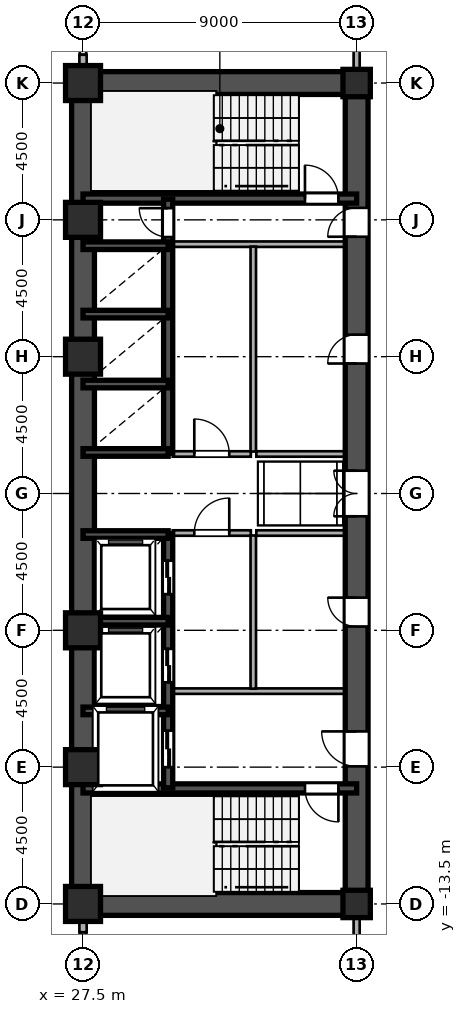
"""IFC4 building model, lengths in metres.
Left out: names, types, materials, properties, quantities, classifications, styles, units other than length and angle.
Written with IfcOpenShell. Run it as: python <this file> out.ifc"""

import sys

from ifc_helpers import new_model, si_unit, direction, frame, frame_2d, origin, origin_2d, place, context, subcontext, project, spatial, rectangle, hollow_rectangle, i_section, extrude, source, transform, mapped, element, fill, save


model = new_model("IFC4")
c1 = context("Model", 3, precision=1e-05, world=origin(), true_north=direction((0.0, 1.0)))
c2 = subcontext(c1, "Body", "Model", "MODEL_VIEW")
j1 = project(units=[si_unit("LENGTHUNIT", "METRE"), si_unit("PLANEANGLEUNIT", "RADIAN")], contexts=[c1])
p1 = place(None, origin())
s1 = spatial("IfcSite", under=j1, at=p1, CompositionType="ELEMENT")
p2 = place(p1, origin())
s2 = spatial("IfcBuilding", under=s1, at=p2, CompositionType="ELEMENT")
p3 = place(p2, frame((0.0, 0.0, 22.5)))
s3 = spatial("IfcBuildingStorey", under=s2, at=p3, CompositionType="ELEMENT", Elevation=22.5)
m1 = source(origin(), c2, "Body", "SweptSolid", [
    extrude(hollow_rectangle(XDim=1.15, YDim=1.15, WallThickness=0.048, at=origin_2d()), origin(), (0.0, 0.0, 1.0), 3.6),
])
for number, where, z_axis, x_axis in (
    (1, (27.5, -13.5, 0.0), (0.0, 0.0, 1.0), (1.0, 0.0, 0.0)),
    (2, (27.5, -9.0, 0.0), (0.0, 0.0, 1.0), (1.0, 0.0, 0.0)),
    (3, (27.5, -4.5, 0.0), (0.0, 0.0, 1.0), (1.0, 0.0, 0.0)),
    (4, (27.5, 4.5, 0.0), (0.0, 0.0, 1.0), (1.0, 0.0, 0.0)),
    (5, (27.5, 9.0, 0.0), (0.0, 0.0, 1.0), (1.0, 0.0, 0.0)),
    (6, (27.5, 13.5, 0.0), (0.0, 0.0, 1.0), (1.0, 0.0, 0.0)),
):
    element("IfcColumn", number, at=place(p3, frame(where, z_axis=z_axis, x_axis=x_axis)), inside=s3, PredefinedType="COLUMN", context=c2, shape_type="MappedRepresentation", body=[
        mapped(m1, transform((0.0, 0.0, 0.0), scale=1.0)),
    ])
m2 = source(origin(), c2, "Body", "SweptSolid", [
    extrude(i_section(OverallWidth=0.9, OverallDepth=0.9, WebThickness=0.036, FlangeThickness=0.055, at=origin_2d()), origin(), (0.0, 0.0, 1.0), 3.6),
])
for number, where, z_axis, x_axis in (
    (7, (36.5, -13.5, 0.0), (0.0, 0.0, 1.0), (1.0, 0.0, 0.0)),
    (8, (36.5, 13.5, 0.0), (0.0, 0.0, 1.0), (1.0, 0.0, 0.0)),
):
    element("IfcColumn", number, at=place(p3, frame(where, z_axis=z_axis, x_axis=x_axis)), inside=s3, PredefinedType="COLUMN", context=c2, shape_type="MappedRepresentation", body=[
        mapped(m2, transform((0.0, 0.0, 0.0), scale=1.0)),
    ])
for number, where, z_axis, x_axis in (
    (9, (27.5, -14.43, 0.0), (0.0, 0.0, 1.0), (0.0, 1.0, 0.0)),
    (10, (27.5, 13.88, 0.0), (0.0, 0.0, 1.0), (0.0, 1.0, 0.0)),
):
    element("IfcWall", number, at=place(p3, frame(where, z_axis=z_axis, x_axis=x_axis)), inside=s3, PredefinedType="SOLIDWALL", context=c2, shape_type="SweptSolid", body=[
        extrude(rectangle(XDim=0.55, YDim=0.24, at=frame_2d((0.275, 0.0))), origin(), (0.0, 0.0, 1.0), 2.88),
    ])
for number, where, z_axis, x_axis in (
    (11, (27.5, -13.5, 0.0), (0.0, 0.0, 1.0), (0.0, 1.0, 0.0)),
    (12, (27.5, 1.3, 0.0), (0.0, 0.0, 1.0), (0.0, 1.0, 0.0)),
):
    element("IfcWall", number, at=place(p3, frame(where, z_axis=z_axis, x_axis=x_axis)), inside=s3, PredefinedType="SHEAR", context=c2, shape_type="SweptSolid", body=[
        extrude(rectangle(XDim=12.2, YDim=0.75, at=frame_2d((6.1, 0.0))), origin(), (0.0, 0.0, 1.0), 3.38),
    ])
p4 = place(p3, frame((27.5, -1.3, 0.0), z_axis=(0.0, 0.0, 1.0), x_axis=(0.0, 1.0, 0.0)))
e13 = element("IfcWall", 13, at=p4, inside=s3, PredefinedType="SHEAR", context=c2, shape_type="SweptSolid", body=[
    extrude(rectangle(XDim=2.6, YDim=0.75, at=frame_2d((1.3, 0.0))), origin(), (0.0, 0.0, 1.0), 3.38),
])
for number, where, z_axis, x_axis in (
    (14, (27.5, -13.5, 0.0), (0.0, 0.0, 1.0), (1.0, 0.0, 0.0)),
    (15, (27.5, 13.5, 0.0), (0.0, 0.0, 1.0), (1.0, 0.0, 0.0)),
):
    element("IfcWall", number, at=place(p3, frame(where, z_axis=z_axis, x_axis=x_axis)), inside=s3, PredefinedType="SHEAR", context=c2, shape_type="SweptSolid", body=[
        extrude(rectangle(XDim=9.0, YDim=0.75, at=frame_2d((4.5, 0.0))), origin(), (0.0, 0.0, 1.0), 3.38),
    ])
p5 = place(p3, frame((36.5, -13.65, 0.0), z_axis=(0.0, 0.0, 1.0), x_axis=(0.0, 1.0, 0.0)))
e16 = element("IfcWall", 16, at=p5, inside=s3, PredefinedType="SHEAR", context=c2, shape_type="SweptSolid", body=[
    extrude(rectangle(XDim=7.15, YDim=0.75, at=frame_2d((3.575, 0.0))), origin(), (0.0, 0.0, 1.0), 3.38),
])
p6 = place(p5, frame((4.675, 0.0, 0.0)))
e17 = element("IfcOpeningElement", 17, at=p6, cuts=e16, PredefinedType="OPENING", context=c2, shape_type="SweptSolid", body=[
    extrude(rectangle(XDim=1.15, YDim=2.2, at=frame_2d((0.575, 1.1))), frame((0.0, 0.385, 0.0), z_axis=(0.0, -1.0, 0.0), x_axis=(1.0, 0.0, 0.0)), (0.0, 0.0, 1.0), 0.77),
])
p7 = place(p3, frame((36.5, -1.3, 0.0), z_axis=(0.0, 0.0, 1.0), x_axis=(0.0, 1.0, 0.0)))
e18 = element("IfcWall", 18, at=p7, inside=s3, PredefinedType="SHEAR", context=c2, shape_type="SweptSolid", body=[
    extrude(rectangle(XDim=2.6, YDim=0.75, at=frame_2d((1.3, 0.0))), origin(), (0.0, 0.0, 1.0), 3.38),
])
p8 = place(p7, frame((0.55, 0.0, 0.0)))
e19 = element("IfcOpeningElement", 19, at=p8, cuts=e18, PredefinedType="OPENING", context=c2, shape_type="SweptSolid", body=[
    extrude(rectangle(XDim=1.5, YDim=2.3, at=frame_2d((0.75, 1.15))), frame((0.0, 0.385, 0.0), z_axis=(0.0, -1.0, 0.0), x_axis=(1.0, 0.0, 0.0)), (0.0, 0.0, 1.0), 0.77),
])
p9 = place(p3, frame((36.5, 8.2, 0.0), z_axis=(0.0, 0.0, 1.0), x_axis=(0.0, 1.0, 0.0)))
e20 = element("IfcWall", 20, at=p9, inside=s3, PredefinedType="SHEAR", context=c2, shape_type="SweptSolid", body=[
    extrude(rectangle(XDim=5.45, YDim=0.75, at=frame_2d((2.725, 0.0))), origin(), (0.0, 0.0, 1.0), 3.38),
])
p10 = place(p9, frame((0.245, 0.0, 0.0)))
e21 = element("IfcOpeningElement", 21, at=p10, cuts=e20, PredefinedType="OPENING", context=c2, shape_type="SweptSolid", body=[
    extrude(rectangle(XDim=0.95, YDim=2.15, at=frame_2d((0.475, 1.075))), frame((0.0, 0.385, 0.0), z_axis=(0.0, -1.0, 0.0), x_axis=(1.0, 0.0, 0.0)), (0.0, 0.0, 1.0), 0.77),
])
p11 = place(p3, frame((36.5, -6.5, 0.0), z_axis=(0.0, 0.0, 1.0), x_axis=(0.0, 1.0, 0.0)))
e22 = element("IfcWall", 22, at=p11, inside=s3, PredefinedType="SHEAR", context=c2, shape_type="SweptSolid", body=[
    extrude(rectangle(XDim=5.2, YDim=0.75, at=frame_2d((2.6, 0.0))), origin(), (0.0, 0.0, 1.0), 3.38),
])
p12 = place(p11, frame((2.125, 0.0, 0.0)))
e23 = element("IfcOpeningElement", 23, at=p12, cuts=e22, PredefinedType="OPENING", context=c2, shape_type="SweptSolid", body=[
    extrude(rectangle(XDim=0.95, YDim=2.15, at=frame_2d((0.475, 1.075))), frame((0.0, 0.385, 0.0), z_axis=(0.0, -1.0, 0.0), x_axis=(1.0, 0.0, 0.0)), (0.0, 0.0, 1.0), 0.77),
])
p13 = place(p3, frame((36.5, 1.3, 0.0), z_axis=(0.0, 0.0, 1.0), x_axis=(0.0, 1.0, 0.0)))
e24 = element("IfcWall", 24, at=p13, inside=s3, PredefinedType="SHEAR", context=c2, shape_type="SweptSolid", body=[
    extrude(rectangle(XDim=6.9, YDim=0.75, at=frame_2d((3.45, 0.0))), origin(), (0.0, 0.0, 1.0), 3.38),
])
p14 = place(p13, frame((2.975, 0.0, 0.0)))
e25 = element("IfcOpeningElement", 25, at=p14, cuts=e24, PredefinedType="OPENING", context=c2, shape_type="SweptSolid", body=[
    extrude(rectangle(XDim=0.95, YDim=2.15, at=frame_2d((0.475, 1.075))), frame((0.0, 0.385, 0.0), z_axis=(0.0, -1.0, 0.0), x_axis=(1.0, 0.0, 0.0)), (0.0, 0.0, 1.0), 0.77),
])
p15 = place(p3, frame((27.5, -9.7, 0.0), z_axis=(0.0, 0.0, 1.0), x_axis=(1.0, 0.0, 0.0)))
e26 = element("IfcWall", 26, at=p15, inside=s3, PredefinedType="SHEAR", context=c2, shape_type="SweptSolid", body=[
    extrude(rectangle(XDim=9.0, YDim=0.3, at=frame_2d((4.5, 0.0))), origin(), (0.0, 0.0, 1.0), 3.38),
])
p16 = place(p15, frame((7.3, 0.0, 0.0)))
e27 = element("IfcOpeningElement", 27, at=p16, cuts=e26, PredefinedType="OPENING", context=c2, shape_type="SweptSolid", body=[
    extrude(rectangle(XDim=1.1, YDim=2.2, at=frame_2d((0.55, 1.1))), frame((0.0, 0.16, 0.0), z_axis=(0.0, -1.0, 0.0), x_axis=(1.0, 0.0, 0.0)), (0.0, 0.0, 1.0), 0.32),
])
p17 = place(p3, frame((27.5, 9.7, 0.0), z_axis=(0.0, 0.0, 1.0), x_axis=(1.0, 0.0, 0.0)))
e28 = element("IfcWall", 28, at=p17, inside=s3, PredefinedType="SHEAR", context=c2, shape_type="SweptSolid", body=[
    extrude(rectangle(XDim=9.0, YDim=0.3, at=frame_2d((4.5, 0.0))), origin(), (0.0, 0.0, 1.0), 3.38),
])
p18 = place(p17, frame((7.3, 0.0, 0.0)))
e29 = element("IfcOpeningElement", 29, at=p18, cuts=e28, PredefinedType="OPENING", context=c2, shape_type="SweptSolid", body=[
    extrude(rectangle(XDim=1.1, YDim=2.2, at=frame_2d((0.55, 1.1))), frame((0.0, 0.16, 0.0), z_axis=(0.0, -1.0, 0.0), x_axis=(1.0, 0.0, 0.0)), (0.0, 0.0, 1.0), 0.32),
])
for number, where, z_axis, x_axis in (
    (30, (27.5, -7.15, 0.0), (0.0, 0.0, 1.0), (1.0, 0.0, 0.0)),
    (31, (27.5, -4.2, 0.0), (0.0, 0.0, 1.0), (1.0, 0.0, 0.0)),
    (32, (27.5, -1.35, 0.0), (0.0, 0.0, 1.0), (1.0, 0.0, 0.0)),
    (33, (27.5, 1.35, 0.0), (0.0, 0.0, 1.0), (1.0, 0.0, 0.0)),
    (34, (27.5, 3.6, 0.0), (0.0, 0.0, 1.0), (1.0, 0.0, 0.0)),
    (35, (27.5, 5.9, 0.0), (0.0, 0.0, 1.0), (1.0, 0.0, 0.0)),
    (36, (27.5, 8.15, 0.0), (0.0, 0.0, 1.0), (1.0, 0.0, 0.0)),
):
    element("IfcWall", number, at=place(p3, frame(where, z_axis=z_axis, x_axis=x_axis)), inside=s3, PredefinedType="SHEAR", context=c2, shape_type="SweptSolid", body=[
        extrude(rectangle(XDim=2.8, YDim=0.25, at=frame_2d((1.4, 0.0))), origin(), (0.0, 0.0, 1.0), 3.38),
    ])
p19 = place(p3, frame((30.3, -9.68, 0.0), z_axis=(0.0, 0.0, 1.0), x_axis=(0.0, 1.0, 0.0)))
e37 = element("IfcWall", 37, at=p19, inside=s3, PredefinedType="SHEAR", context=c2, shape_type="SweptSolid", body=[
    extrude(rectangle(XDim=2.56, YDim=0.3, at=frame_2d((1.28, 0.0))), origin(), (0.0, 0.0, 1.0), 3.38),
])
p20 = place(p19, frame((0.68, 0.0, 0.0)))
e38 = element("IfcOpeningElement", 38, at=p20, cuts=e37, PredefinedType="OPENING", context=c2, shape_type="SweptSolid", body=[
    extrude(rectangle(XDim=1.2, YDim=2.25, at=frame_2d((0.6, 1.125))), frame((0.0, 0.16, 0.0), z_axis=(0.0, -1.0, 0.0), x_axis=(1.0, 0.0, 0.0)), (0.0, 0.0, 1.0), 0.32),
])
p21 = place(p3, frame((30.3, -7.12, 0.0), z_axis=(0.0, 0.0, 1.0), x_axis=(0.0, 1.0, 0.0)))
e39 = element("IfcWall", 39, at=p21, inside=s3, PredefinedType="SHEAR", context=c2, shape_type="SweptSolid", body=[
    extrude(rectangle(XDim=2.92, YDim=0.3, at=frame_2d((1.46, 0.0))), origin(), (0.0, 0.0, 1.0), 3.38),
])
p22 = place(p21, frame((0.91, 0.0, 0.0)))
e40 = element("IfcOpeningElement", 40, at=p22, cuts=e39, PredefinedType="OPENING", context=c2, shape_type="SweptSolid", body=[
    extrude(rectangle(XDim=1.1, YDim=2.2, at=frame_2d((0.55, 1.1))), frame((0.0, 0.16, 0.0), z_axis=(0.0, -1.0, 0.0), x_axis=(1.0, 0.0, 0.0)), (0.0, 0.0, 1.0), 0.32),
])
p23 = place(p3, frame((30.3, -4.2, 0.0), z_axis=(0.0, 0.0, 1.0), x_axis=(0.0, 1.0, 0.0)))
e41 = element("IfcWall", 41, at=p23, inside=s3, PredefinedType="SHEAR", context=c2, shape_type="SweptSolid", body=[
    extrude(rectangle(XDim=2.88, YDim=0.3, at=frame_2d((1.44, 0.0))), origin(), (0.0, 0.0, 1.0), 3.38),
])
p24 = place(p23, frame((0.89, 0.0, 0.0)))
e42 = element("IfcOpeningElement", 42, at=p24, cuts=e41, PredefinedType="OPENING", context=c2, shape_type="SweptSolid", body=[
    extrude(rectangle(XDim=1.1, YDim=2.2, at=frame_2d((0.55, 1.1))), frame((0.0, 0.16, 0.0), z_axis=(0.0, -1.0, 0.0), x_axis=(1.0, 0.0, 0.0)), (0.0, 0.0, 1.0), 0.32),
])
p25 = place(p3, frame((30.3, 1.32, 0.0), z_axis=(0.0, 0.0, 1.0), x_axis=(0.0, 1.0, 0.0)))
e43 = element("IfcWall", 43, at=p25, inside=s3, PredefinedType="SHEAR", context=c2, shape_type="SweptSolid", body=[
    extrude(rectangle(XDim=2.28, YDim=0.3, at=frame_2d((1.14, 0.0))), origin(), (0.0, 0.0, 1.0), 3.38),
])
p26 = place(p3, frame((30.3, 3.6, 0.0), z_axis=(0.0, 0.0, 1.0), x_axis=(0.0, 1.0, 0.0)))
e44 = element("IfcWall", 44, at=p26, inside=s3, PredefinedType="SHEAR", context=c2, shape_type="SweptSolid", body=[
    extrude(rectangle(XDim=2.3, YDim=0.3, at=frame_2d((1.15, 0.0))), origin(), (0.0, 0.0, 1.0), 3.38),
])
p27 = place(p3, frame((30.3, 5.9, 0.0), z_axis=(0.0, 0.0, 1.0), x_axis=(0.0, 1.0, 0.0)))
e45 = element("IfcWall", 45, at=p27, inside=s3, PredefinedType="SHEAR", context=c2, shape_type="SweptSolid", body=[
    extrude(rectangle(XDim=2.25, YDim=0.3, at=frame_2d((1.125, 0.0))), origin(), (0.0, 0.0, 1.0), 3.38),
])
p28 = place(p3, frame((30.3, 8.15, 0.0), z_axis=(0.0, 0.0, 1.0), x_axis=(0.0, 1.0, 0.0)))
e46 = element("IfcWall", 46, at=p28, inside=s3, PredefinedType="SHEAR", context=c2, shape_type="SweptSolid", body=[
    extrude(rectangle(XDim=1.53, YDim=0.3, at=frame_2d((0.765, 0.0))), origin(), (0.0, 0.0, 1.0), 3.38),
])
p29 = place(p28, frame((0.285, 0.0, 0.0)))
e47 = element("IfcOpeningElement", 47, at=p29, cuts=e46, PredefinedType="OPENING", context=c2, shape_type="SweptSolid", body=[
    extrude(rectangle(XDim=0.95, YDim=2.15, at=frame_2d((0.475, 1.075))), frame((0.0, 0.16, 0.0), z_axis=(0.0, -1.0, 0.0), x_axis=(1.0, 0.0, 0.0)), (0.0, 0.0, 1.0), 0.32),
])
for number, where, z_axis, x_axis in (
    (48, (30.45, -6.5, 0.0), (0.0, 0.0, 1.0), (1.0, 0.0, 0.0)),
    (49, (30.45, 8.2, 0.0), (0.0, 0.0, 1.0), (1.0, 0.0, 0.0)),
):
    element("IfcWall", number, at=place(p3, frame(where, z_axis=z_axis, x_axis=x_axis)), inside=s3, PredefinedType="PARTITIONING", context=c2, shape_type="SweptSolid", body=[
        extrude(rectangle(XDim=5.7, YDim=0.18, at=frame_2d((2.85, 0.0))), origin(), (0.0, 0.0, 1.0), 3.38),
    ])
p30 = place(p3, frame((33.1, -6.42, 0.0), z_axis=(0.0, 0.0, 1.0), x_axis=(0.0, 1.0, 0.0)))
e50 = element("IfcWall", 50, at=p30, inside=s3, PredefinedType="PARTITIONING", context=c2, shape_type="SweptSolid", body=[
    extrude(rectangle(XDim=5.04, YDim=0.18, at=frame_2d((2.52, 0.0))), origin(), (0.0, 0.0, 1.0), 3.38),
])
p31 = place(p3, frame((33.1, 1.38, 0.0), z_axis=(0.0, 0.0, 1.0), x_axis=(0.0, 1.0, 0.0)))
e51 = element("IfcWall", 51, at=p31, inside=s3, PredefinedType="PARTITIONING", context=c2, shape_type="SweptSolid", body=[
    extrude(rectangle(XDim=6.74, YDim=0.18, at=frame_2d((3.37, 0.0))), origin(), (0.0, 0.0, 1.0), 3.38),
])
p32 = place(p3, frame((30.45, -1.3, 0.0), z_axis=(0.0, 0.0, 1.0), x_axis=(1.0, 0.0, 0.0)))
e52 = element("IfcWall", 52, at=p32, inside=s3, PredefinedType="PARTITIONING", context=c2, shape_type="SweptSolid", body=[
    extrude(rectangle(XDim=2.57, YDim=0.18, at=frame_2d((1.285, 0.0))), origin(), (0.0, 0.0, 1.0), 3.38),
])
p33 = place(p32, frame((0.71, 0.0, 0.0)))
e53 = element("IfcOpeningElement", 53, at=p33, cuts=e52, PredefinedType="OPENING", context=c2, shape_type="SweptSolid", body=[
    extrude(rectangle(XDim=1.15, YDim=2.2, at=frame_2d((0.575, 1.1))), frame((0.0, 0.1, 0.0), z_axis=(0.0, -1.0, 0.0), x_axis=(1.0, 0.0, 0.0)), (0.0, 0.0, 1.0), 0.2),
])
p34 = place(p3, frame((30.45, 1.3, 0.0), z_axis=(0.0, 0.0, 1.0), x_axis=(1.0, 0.0, 0.0)))
e54 = element("IfcWall", 54, at=p34, inside=s3, PredefinedType="PARTITIONING", context=c2, shape_type="SweptSolid", body=[
    extrude(rectangle(XDim=2.57, YDim=0.18, at=frame_2d((1.285, 0.0))), origin(), (0.0, 0.0, 1.0), 3.38),
])
p35 = place(p34, frame((0.71, 0.0, 0.0)))
e55 = element("IfcOpeningElement", 55, at=p35, cuts=e54, PredefinedType="OPENING", context=c2, shape_type="SweptSolid", body=[
    extrude(rectangle(XDim=1.15, YDim=2.2, at=frame_2d((0.575, 1.1))), frame((0.0, 0.1, 0.0), z_axis=(0.0, -1.0, 0.0), x_axis=(1.0, 0.0, 0.0)), (0.0, 0.0, 1.0), 0.2),
])
for number, where, z_axis, x_axis in (
    (56, (33.2, -1.3, 0.0), (0.0, 0.0, 1.0), (1.0, 0.0, 0.0)),
    (57, (33.2, 1.3, 0.0), (0.0, 0.0, 1.0), (1.0, 0.0, 0.0)),
):
    element("IfcWall", number, at=place(p3, frame(where, z_axis=z_axis, x_axis=x_axis)), inside=s3, PredefinedType="PARTITIONING", context=c2, shape_type="SweptSolid", body=[
        extrude(rectangle(XDim=2.95, YDim=0.18, at=frame_2d((1.475, 0.0))), origin(), (0.0, 0.0, 1.0), 3.38),
    ])
for number, where, z_axis, x_axis in (
    (58, (36.5, -15.515, 0.0), (0.0, 0.0, 1.0), (0.0, 1.0, 0.0)),
    (59, (36.5, 13.88, 0.0), (0.0, 0.0, 1.0), (0.0, 1.0, 0.0)),
):
    element("IfcWall", number, at=place(p3, frame(where, z_axis=z_axis, x_axis=x_axis)), inside=s3, PredefinedType="PARTITIONING", context=c2, shape_type="SweptSolid", body=[
        extrude(rectangle(XDim=1.635, YDim=0.2, at=frame_2d((0.817, 0.0))), origin(), (0.0, 0.0, 1.0), 2.68),
    ])
m3 = source(origin(), c2, "Body", "SweptSolid", [
    extrude(rectangle(XDim=1.15, YDim=2.2, at=frame_2d((0.575, 1.1))), frame((0.0, 0.025, 0.0), z_axis=(0.0, -1.0, 0.0), x_axis=(1.0, 0.0, 0.0)), (0.0, 0.0, 1.0), 0.05),
])
p36 = place(p6, origin())
e60 = element("IfcDoor", 60, at=p36, inside=s3, OperationType="SINGLE_SWING_RIGHT", PredefinedType="DOOR", context=c2, shape_type="MappedRepresentation", body=[
    mapped(m3, transform((0.0, 0.0, 0.0), scale=1.0)),
])
fill(e17, e60)
m4 = source(origin(), c2, "Body", "SweptSolid", [
    extrude(rectangle(XDim=1.5, YDim=2.3, at=frame_2d((0.75, 1.15))), frame((0.0, 0.025, 0.0), z_axis=(0.0, -1.0, 0.0), x_axis=(1.0, 0.0, 0.0)), (0.0, 0.0, 1.0), 0.05),
])
p37 = place(p8, origin())
e61 = element("IfcDoor", 61, at=p37, inside=s3, OperationType="DOUBLE_SWING_LEFT", PredefinedType="DOOR", context=c2, shape_type="MappedRepresentation", body=[
    mapped(m4, transform((0.0, 0.0, 0.0), scale=1.0)),
])
fill(e19, e61)
m5 = source(origin(), c2, "Body", "SweptSolid", [
    extrude(rectangle(XDim=0.95, YDim=2.15, at=frame_2d((0.475, 1.075))), frame((0.0, 0.025, 0.0), z_axis=(0.0, -1.0, 0.0), x_axis=(1.0, 0.0, 0.0)), (0.0, 0.0, 1.0), 0.05),
])
p38 = place(p10, origin())
e62 = element("IfcDoor", 62, at=p38, inside=s3, OperationType="SINGLE_SWING_LEFT", PredefinedType="DOOR", context=c2, shape_type="MappedRepresentation", body=[
    mapped(m5, transform((0.0, 0.0, 0.0), scale=1.0)),
])
fill(e21, e62)
p39 = place(p12, origin())
e63 = element("IfcDoor", 63, at=p39, inside=s3, OperationType="SINGLE_SWING_RIGHT", PredefinedType="DOOR", context=c2, shape_type="MappedRepresentation", body=[
    mapped(m5, transform((0.0, 0.0, 0.0), scale=1.0)),
])
fill(e23, e63)
p40 = place(p14, origin())
e64 = element("IfcDoor", 64, at=p40, inside=s3, OperationType="SINGLE_SWING_LEFT", PredefinedType="DOOR", context=c2, shape_type="MappedRepresentation", body=[
    mapped(m5, transform((0.0, 0.0, 0.0), scale=1.0)),
])
fill(e25, e64)
m6 = source(origin(), c2, "Body", "SweptSolid", [
    extrude(rectangle(XDim=1.1, YDim=2.2, at=frame_2d((0.55, 1.1))), frame((0.0, 0.025, 0.0), z_axis=(0.0, -1.0, 0.0), x_axis=(1.0, 0.0, 0.0)), (0.0, 0.0, 1.0), 0.05),
])
p41 = place(p16, frame((1.1, 0.0, 0.0), z_axis=(0.0, 0.0, 1.0), x_axis=(-1.0, 0.0, 0.0)))
e65 = element("IfcDoor", 65, at=p41, inside=s3, OperationType="SINGLE_SWING_RIGHT", PredefinedType="DOOR", context=c2, shape_type="MappedRepresentation", body=[
    mapped(m6, transform((0.0, 0.0, 0.0), scale=1.0)),
])
fill(e27, e65)
p42 = place(p18, origin())
e66 = element("IfcDoor", 66, at=p42, inside=s3, OperationType="SINGLE_SWING_LEFT", PredefinedType="DOOR", context=c2, shape_type="MappedRepresentation", body=[
    mapped(m6, transform((0.0, 0.0, 0.0), scale=1.0)),
])
fill(e29, e66)
m7 = source(origin(), c2, "Body", "SweptSolid", [
    extrude(rectangle(XDim=1.2, YDim=2.25, at=frame_2d((0.6, 1.125))), frame((0.0, 0.025, 0.0), z_axis=(0.0, -1.0, 0.0), x_axis=(1.0, 0.0, 0.0)), (0.0, 0.0, 1.0), 0.05),
])
p43 = place(p20, origin())
e67 = element("IfcDoor", 67, at=p43, inside=s3, OperationType="DOUBLE_DOOR_SLIDING", PredefinedType="DOOR", context=c2, shape_type="MappedRepresentation", body=[
    mapped(m7, transform((0.0, 0.0, 0.0), scale=1.0)),
])
fill(e38, e67)
m8 = source(origin(), c2, "Body", "SweptSolid", [
    extrude(rectangle(XDim=1.1, YDim=2.2, at=frame_2d((0.55, 1.1))), frame((0.0, 0.025, 0.0), z_axis=(0.0, -1.0, 0.0), x_axis=(1.0, 0.0, 0.0)), (0.0, 0.0, 1.0), 0.05),
])
p44 = place(p22, origin())
e68 = element("IfcDoor", 68, at=p44, inside=s3, OperationType="DOUBLE_DOOR_SLIDING", PredefinedType="DOOR", context=c2, shape_type="MappedRepresentation", body=[
    mapped(m8, transform((0.0, 0.0, 0.0), scale=1.0)),
])
fill(e40, e68)
p45 = place(p24, origin())
e69 = element("IfcDoor", 69, at=p45, inside=s3, OperationType="DOUBLE_DOOR_SLIDING", PredefinedType="DOOR", context=c2, shape_type="MappedRepresentation", body=[
    mapped(m8, transform((0.0, 0.0, 0.0), scale=1.0)),
])
fill(e42, e69)
p46 = place(p29, origin())
e70 = element("IfcDoor", 70, at=p46, inside=s3, OperationType="SINGLE_SWING_RIGHT", PredefinedType="DOOR", context=c2, shape_type="MappedRepresentation", body=[
    mapped(m5, transform((0.0, 0.0, 0.0), scale=1.0)),
])
fill(e47, e70)
p47 = place(p33, origin())
e71 = element("IfcDoor", 71, at=p47, inside=s3, OperationType="SINGLE_SWING_RIGHT", PredefinedType="DOOR", context=c2, shape_type="MappedRepresentation", body=[
    mapped(m3, transform((0.0, 0.0, 0.0), scale=1.0)),
])
fill(e53, e71)
p48 = place(p35, origin())
e72 = element("IfcDoor", 72, at=p48, inside=s3, OperationType="SINGLE_SWING_LEFT", PredefinedType="DOOR", context=c2, shape_type="MappedRepresentation", body=[
    mapped(m3, transform((0.0, 0.0, 0.0), scale=1.0)),
])
fill(e55, e72)
save(model, sys.argv[1])
